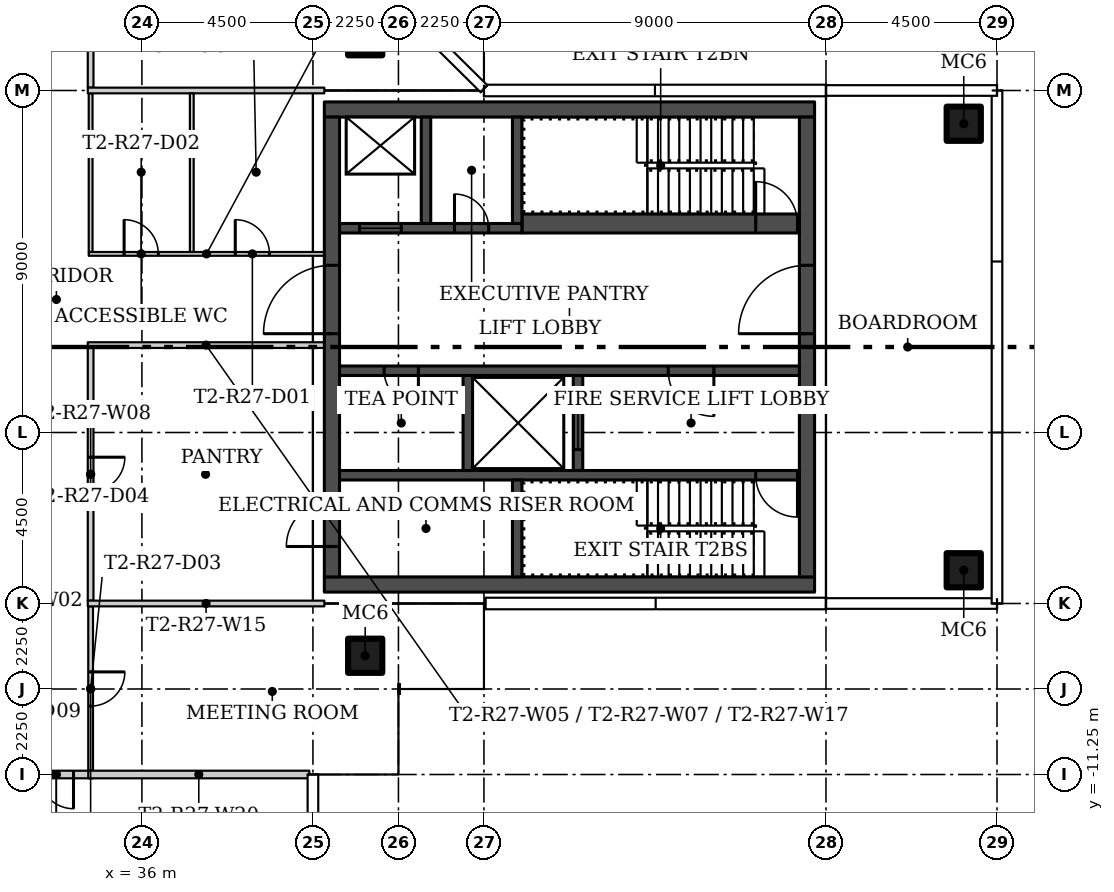
"""IFC4 building model, lengths in metres.
Left out: names, types, materials, properties, quantities, classifications, styles, units other than length and angle.
Written with IfcOpenShell. Run it as: python <this file> out.ifc"""

import sys

from ifc_helpers import new_model, si_unit, direction, frame, frame_2d, origin, origin_2d, place, context, subcontext, project, spatial, rectangle, hollow_rectangle, extrude, element, fill, save


model = new_model("IFC4")
c1 = context("Model", 3, precision=1e-05, world=origin(), true_north=direction((0.0, 1.0)))
c2 = subcontext(c1, "Body", "Model", "MODEL_VIEW")
j1 = project(units=[si_unit("LENGTHUNIT", "METRE"), si_unit("PLANEANGLEUNIT", "RADIAN")], contexts=[c1])
p1 = place(None, origin())
s1 = spatial("IfcSite", under=j1, at=p1, CompositionType="ELEMENT")
p2 = place(p1, origin())
s2 = spatial("IfcBuilding", under=s1, at=p2, CompositionType="ELEMENT")
p3 = place(p2, frame((0.0, 0.0, 249.9)))
s3 = spatial("IfcBuildingStorey", under=s2, at=p3, CompositionType="ELEMENT", Elevation=249.9)
for number, where in (
    (1, (41.875, 8.125, 0.0)),
    (2, (41.875, -8.125, 0.0)),
    (3, (57.625, -5.875, 0.0)),
    (4, (57.625, 5.875, 0.0)),
):
    element("IfcColumn", number, at=place(p3, frame(where)), inside=s3, PredefinedType="COLUMN", context=c2, shape_type="SweptSolid", body=[
        extrude(hollow_rectangle(XDim=0.9, YDim=0.9, WallThickness=0.036, at=origin_2d()), origin(), (0.0, 0.0, 1.0), 3.55),
    ])
p4 = place(p3, frame((40.8, 0.05, 0.0), z_axis=(0.0, 0.0, 1.0), x_axis=(-1.0, 0.0, 0.0)))
e5 = element("IfcWall", 5, at=p4, inside=s3, PredefinedType="PARTITIONING", context=c2, shape_type="SweptSolid", body=[
    extrude(rectangle(XDim=6.225, YDim=0.15, at=frame_2d((3.112, 0.0))), origin(), (0.0, 0.0, 1.0), 3.55),
])
p5 = place(p3, frame((34.6, 2.45, 0.0)))
e6 = element("IfcWall", 6, at=p5, inside=s3, PredefinedType="PARTITIONING", context=c2, shape_type="SweptSolid", body=[
    extrude(rectangle(XDim=6.2, YDim=0.1, at=frame_2d((3.1, 0.0))), origin(), (0.0, 0.0, 1.0), 3.55),
])
p6 = place(p5, frame((3.856, 0.0, 0.0)))
e7 = element("IfcOpeningElement", 7, at=p6, cuts=e6, PredefinedType="OPENING", context=c2, shape_type="SweptSolid", body=[
    extrude(rectangle(XDim=0.9, YDim=2.1, at=frame_2d((0.45, 1.05))), frame((0.0, 0.06, 0.0), z_axis=(0.0, -1.0, 0.0), x_axis=(1.0, 0.0, 0.0)), (0.0, 0.0, 1.0), 0.12),
])
p7 = place(p5, frame((0.931, 0.0, 0.0)))
e8 = element("IfcOpeningElement", 8, at=p7, cuts=e6, PredefinedType="OPENING", context=c2, shape_type="SweptSolid", body=[
    extrude(rectangle(XDim=0.9, YDim=2.1, at=frame_2d((0.45, 1.05))), frame((0.0, 0.06, 0.0), z_axis=(0.0, -1.0, 0.0), x_axis=(1.0, 0.0, 0.0)), (0.0, 0.0, 1.0), 0.12),
])
p8 = place(p3, frame((34.65, 6.675, 0.0), z_axis=(0.0, 0.0, 1.0), x_axis=(0.0, -1.0, 0.0)))
e9 = element("IfcWall", 9, at=p8, inside=s3, PredefinedType="PARTITIONING", context=c2, shape_type="SweptSolid", body=[
    extrude(rectangle(XDim=4.175, YDim=0.1, at=frame_2d((2.087, 0.0))), origin(), (0.0, 0.0, 1.0), 3.55),
])
p9 = place(p3, frame((34.65, -0.025, 0.0), z_axis=(0.0, 0.0, 1.0), x_axis=(0.0, -1.0, 0.0)))
e10 = element("IfcWall", 10, at=p9, inside=s3, PredefinedType="PARTITIONING", context=c2, shape_type="SweptSolid", body=[
    extrude(rectangle(XDim=6.65, YDim=0.15, at=frame_2d((3.325, 0.0))), origin(), (0.0, 0.0, 1.0), 3.55),
])
p10 = place(p9, frame((2.875, 0.0, 0.0)))
e11 = element("IfcOpeningElement", 11, at=p10, cuts=e10, PredefinedType="OPENING", context=c2, shape_type="SweptSolid", body=[
    extrude(rectangle(XDim=0.9, YDim=2.1, at=frame_2d((0.45, 1.05))), frame((0.0, 0.085, 0.0), z_axis=(0.0, -1.0, 0.0), x_axis=(1.0, 0.0, 0.0)), (0.0, 0.0, 1.0), 0.17),
])
p11 = place(p3, frame((34.65, 15.65, 0.0), z_axis=(0.0, 0.0, 1.0), x_axis=(0.0, -1.0, 0.0)))
e12 = element("IfcWall", 12, at=p11, inside=s3, PredefinedType="PARTITIONING", context=c2, shape_type="SweptSolid", body=[
    extrude(rectangle(XDim=8.825, YDim=0.15, at=frame_2d((4.413, 0.0))), origin(), (0.0, 0.0, 1.0), 3.55),
])
p12 = place(p11, frame((3.65, 0.0, 0.0)))
e13 = element("IfcOpeningElement", 13, at=p12, cuts=e12, PredefinedType="OPENING", context=c2, shape_type="SweptSolid", body=[
    extrude(rectangle(XDim=1.5, YDim=2.1, at=frame_2d((0.75, 1.05))), frame((0.0, 0.085, 0.0), z_axis=(0.0, -1.0, 0.0), x_axis=(1.0, 0.0, 0.0)), (0.0, 0.0, 1.0), 0.17),
])
p13 = place(p3, frame((34.65, -6.825, 0.0), z_axis=(0.0, 0.0, 1.0), x_axis=(0.0, -1.0, 0.0)))
e14 = element("IfcWall", 14, at=p13, inside=s3, PredefinedType="PARTITIONING", context=c2, shape_type="SweptSolid", body=[
    extrude(rectangle(XDim=4.325, YDim=0.125, at=frame_2d((2.163, 0.0))), origin(), (0.0, 0.0, 1.0), 3.55),
])
p14 = place(p13, frame((1.725, 0.0, 0.0)))
e15 = element("IfcOpeningElement", 15, at=p14, cuts=e14, PredefinedType="OPENING", context=c2, shape_type="SweptSolid", body=[
    extrude(rectangle(XDim=0.9, YDim=2.1, at=frame_2d((0.45, 1.05))), frame((0.0, 0.073, 0.0), z_axis=(0.0, -1.0, 0.0), x_axis=(1.0, 0.0, 0.0)), (0.0, 0.0, 1.0), 0.145),
])
p15 = place(p3, frame((34.713, -11.25, 0.0), z_axis=(0.0, 0.0, 1.0), x_axis=(-1.0, 0.0, 0.0)))
e16 = element("IfcWall", 16, at=p15, inside=s3, PredefinedType="PARTITIONING", context=c2, shape_type="SweptSolid", body=[
    extrude(rectangle(XDim=1.938, YDim=0.2, at=frame_2d((0.969, 0.0))), origin(), (0.0, 0.0, 1.0), 3.55),
])
p16 = place(p15, frame((0.513, 0.0, 0.0)))
e17 = element("IfcOpeningElement", 17, at=p16, cuts=e16, PredefinedType="OPENING", context=c2, shape_type="SweptSolid", body=[
    extrude(rectangle(XDim=0.9, YDim=2.4, at=frame_2d((0.45, 1.2))), frame((0.0, 0.11, 0.0), z_axis=(0.0, -1.0, 0.0), x_axis=(1.0, 0.0, 0.0)), (0.0, 0.0, 1.0), 0.22),
])
p17 = place(p3, frame((40.8, 6.75, 0.0), z_axis=(0.0, 0.0, 1.0), x_axis=(-1.0, 0.0, 0.0)))
e18 = element("IfcWall", 18, at=p17, inside=s3, PredefinedType="PARTITIONING", context=c2, shape_type="SweptSolid", body=[
    extrude(rectangle(XDim=6.225, YDim=0.15, at=frame_2d((3.112, 0.0))), origin(), (0.0, 0.0, 1.0), 3.55),
])
p18 = place(p3, frame((34.575, -6.75, 0.0)))
e19 = element("IfcWall", 19, at=p18, inside=s3, PredefinedType="PARTITIONING", context=c2, shape_type="SweptSolid", body=[
    extrude(rectangle(XDim=6.225, YDim=0.15, at=frame_2d((3.112, 0.0))), origin(), (0.0, 0.0, 1.0), 3.55),
])
p19 = place(p3, frame((37.312, 6.675, 0.0), z_axis=(0.0, 0.0, 1.0), x_axis=(0.0, -1.0, 0.0)))
e20 = element("IfcWall", 20, at=p19, inside=s3, PredefinedType="PARTITIONING", context=c2, shape_type="SweptSolid", body=[
    extrude(rectangle(XDim=4.175, YDim=0.1, at=frame_2d((2.087, 0.0))), origin(), (0.0, 0.0, 1.0), 3.55),
])
p20 = place(p3, frame((34.588, -11.25, 0.0)))
e21 = element("IfcWall", 21, at=p20, inside=s3, PredefinedType="PARTITIONING", context=c2, shape_type="SweptSolid", body=[
    extrude(rectangle(XDim=5.817, YDim=0.2, at=frame_2d((2.909, 0.0))), origin(), (0.0, 0.0, 1.0), 3.55),
])
for number, where, z_axis, x_axis in (
    (22, (53.7, -6.25, 0.0), (0.0, 0.0, 1.0), (-1.0, 0.0, 0.0)),
    (23, (53.7, 6.25, 0.0), (0.0, 0.0, 1.0), (-1.0, 0.0, 0.0)),
):
    element("IfcWall", number, at=place(p3, frame(where, z_axis=z_axis, x_axis=x_axis)), inside=s3, PredefinedType="SHEAR", context=c2, shape_type="SweptSolid", body=[
        extrude(rectangle(XDim=12.9, YDim=0.4, at=frame_2d((6.45, 0.0))), origin(), (0.0, 0.0, 1.0), 3.55),
    ])
p21 = place(p3, frame((53.5, -6.05, 0.0), z_axis=(0.0, 0.0, 1.0), x_axis=(0.0, 1.0, 0.0)))
e24 = element("IfcWall", 24, at=p21, inside=s3, PredefinedType="SHEAR", context=c2, shape_type="SweptSolid", body=[
    extrude(rectangle(XDim=12.1, YDim=0.4, at=frame_2d((6.05, 0.0))), origin(), (0.0, 0.0, 1.0), 3.55),
])
p22 = place(p21, frame((6.4, 0.0, 0.0)))
e25 = element("IfcOpeningElement", 25, at=p22, cuts=e24, PredefinedType="OPENING", context=c2, shape_type="SweptSolid", body=[
    extrude(rectangle(XDim=1.8, YDim=2.4, at=frame_2d((0.9, 1.2))), frame((0.0, 0.21, 0.0), z_axis=(0.0, -1.0, 0.0), x_axis=(1.0, 0.0, 0.0)), (0.0, 0.0, 1.0), 0.42),
])
p23 = place(p3, frame((41.0, -6.05, 0.0), z_axis=(0.0, 0.0, 1.0), x_axis=(0.0, 1.0, 0.0)))
e26 = element("IfcWall", 26, at=p23, inside=s3, PredefinedType="SHEAR", context=c2, shape_type="SweptSolid", body=[
    extrude(rectangle(XDim=12.1, YDim=0.4, at=frame_2d((6.05, 0.0))), origin(), (0.0, 0.0, 1.0), 3.55),
])
p24 = place(p23, frame((0.8, 0.0, 0.0)))
e27 = element("IfcOpeningElement", 27, at=p24, cuts=e26, PredefinedType="OPENING", context=c2, shape_type="SweptSolid", body=[
    extrude(rectangle(XDim=1.2, YDim=2.1, at=frame_2d((0.6, 1.05))), frame((0.0, 0.21, 0.0), z_axis=(0.0, -1.0, 0.0), x_axis=(1.0, 0.0, 0.0)), (0.0, 0.0, 1.0), 0.42),
])
p25 = place(p23, frame((6.4, 0.0, 0.0)))
e28 = element("IfcOpeningElement", 28, at=p25, cuts=e26, PredefinedType="OPENING", context=c2, shape_type="SweptSolid", body=[
    extrude(rectangle(XDim=1.8, YDim=2.4, at=frame_2d((0.9, 1.2))), frame((0.0, 0.21, 0.0), z_axis=(0.0, -1.0, 0.0), x_axis=(1.0, 0.0, 0.0)), (0.0, 0.0, 1.0), 0.42),
])
p26 = place(p3, frame((53.3, -3.375, 0.0), z_axis=(0.0, 0.0, 1.0), x_axis=(-1.0, 0.0, 0.0)))
e29 = element("IfcWall", 29, at=p26, inside=s3, PredefinedType="SHEAR", context=c2, shape_type="SweptSolid", body=[
    extrude(rectangle(XDim=12.1, YDim=0.25, at=frame_2d((6.05, 0.0))), origin(), (0.0, 0.0, 1.0), 3.55),
])
p27 = place(p26, frame((0.05, 0.0, 0.0)))
e30 = element("IfcOpeningElement", 30, at=p27, cuts=e29, PredefinedType="OPENING", context=c2, shape_type="SweptSolid", body=[
    extrude(rectangle(XDim=1.1, YDim=2.1, at=frame_2d((0.55, 1.05))), frame((0.0, 0.135, 0.0), z_axis=(0.0, -1.0, 0.0), x_axis=(1.0, 0.0, 0.0)), (0.0, 0.0, 1.0), 0.27),
])
p28 = place(p3, frame((45.875, -6.05, 0.0), z_axis=(0.0, 0.0, 1.0), x_axis=(0.0, 1.0, 0.0)))
e31 = element("IfcWall", 31, at=p28, inside=s3, PredefinedType="SHEAR", context=c2, shape_type="SweptSolid", body=[
    extrude(rectangle(XDim=2.55, YDim=0.25, at=frame_2d((1.275, 0.0))), origin(), (0.0, 0.0, 1.0), 3.55),
])
p29 = place(p3, frame((53.3, -0.625, 0.0), z_axis=(0.0, 0.0, 1.0), x_axis=(-1.0, 0.0, 0.0)))
e32 = element("IfcWall", 32, at=p29, inside=s3, PredefinedType="SHEAR", context=c2, shape_type="SweptSolid", body=[
    extrude(rectangle(XDim=12.1, YDim=0.25, at=frame_2d((6.05, 0.0))), origin(), (0.0, 0.0, 1.0), 3.55),
])
p30 = place(p29, frame((2.25, 0.0, 0.0)))
e33 = element("IfcOpeningElement", 33, at=p30, cuts=e32, PredefinedType="OPENING", context=c2, shape_type="SweptSolid", body=[
    extrude(rectangle(XDim=1.2, YDim=2.1, at=frame_2d((0.6, 1.05))), frame((0.0, 0.135, 0.0), z_axis=(0.0, -1.0, 0.0), x_axis=(1.0, 0.0, 0.0)), (0.0, 0.0, 1.0), 0.27),
])
p31 = place(p29, frame((10.025, 0.0, 0.0)))
e34 = element("IfcOpeningElement", 34, at=p31, cuts=e32, PredefinedType="OPENING", context=c2, shape_type="SweptSolid", body=[
    extrude(rectangle(XDim=0.9, YDim=2.1, at=frame_2d((0.45, 1.05))), frame((0.0, 0.135, 0.0), z_axis=(0.0, -1.0, 0.0), x_axis=(1.0, 0.0, 0.0)), (0.0, 0.0, 1.0), 0.27),
])
p32 = place(p3, frame((47.475, -3.25, 0.0), z_axis=(0.0, 0.0, 1.0), x_axis=(0.0, 1.0, 0.0)))
e35 = element("IfcWall", 35, at=p32, inside=s3, PredefinedType="SHEAR", context=c2, shape_type="SweptSolid", body=[
    extrude(rectangle(XDim=2.5, YDim=0.25, at=frame_2d((1.25, 0.0))), origin(), (0.0, 0.0, 1.0), 3.55),
])
p33 = place(p32, frame((0.55, 0.0, 0.0)))
e36 = element("IfcOpeningElement", 36, at=p33, cuts=e35, PredefinedType="OPENING", context=c2, shape_type="SweptSolid", body=[
    extrude(rectangle(XDim=1.4, YDim=2.4, at=frame_2d((0.7, 1.2))), frame((0.0, 0.135, 0.0), z_axis=(0.0, -1.0, 0.0), x_axis=(1.0, 0.0, 0.0)), (0.0, 0.0, 1.0), 0.27),
])
p34 = place(p3, frame((44.575, -3.25, 0.0), z_axis=(0.0, 0.0, 1.0), x_axis=(0.0, 1.0, 0.0)))
e37 = element("IfcWall", 37, at=p34, inside=s3, PredefinedType="SHEAR", context=c2, shape_type="SweptSolid", body=[
    extrude(rectangle(XDim=2.5, YDim=0.25, at=frame_2d((1.25, 0.0))), origin(), (0.0, 0.0, 1.0), 3.55),
])
p35 = place(p3, frame((46.0, 3.25, 0.0)))
e38 = element("IfcWall", 38, at=p35, inside=s3, PredefinedType="SHEAR", context=c2, shape_type="SweptSolid", body=[
    extrude(rectangle(XDim=7.3, YDim=0.5, at=frame_2d((3.65, 0.0))), origin(), (0.0, 0.0, 1.0), 3.55),
])
p36 = place(p35, frame((6.15, 0.0, 0.0)))
e39 = element("IfcOpeningElement", 39, at=p36, cuts=e38, PredefinedType="OPENING", context=c2, shape_type="SweptSolid", body=[
    extrude(rectangle(XDim=1.1, YDim=2.1, at=frame_2d((0.55, 1.05))), frame((0.0, 0.26, 0.0), z_axis=(0.0, -1.0, 0.0), x_axis=(1.0, 0.0, 0.0)), (0.0, 0.0, 1.0), 0.52),
])
p37 = place(p3, frame((41.2, 3.125, 0.0)))
e40 = element("IfcWall", 40, at=p37, inside=s3, PredefinedType="SHEAR", context=c2, shape_type="SweptSolid", body=[
    extrude(rectangle(XDim=4.8, YDim=0.25, at=frame_2d((2.4, 0.0))), origin(), (0.0, 0.0, 1.0), 3.55),
])
p38 = place(p37, frame((0.525, 0.0, 0.0)))
e41 = element("IfcOpeningElement", 41, at=p38, cuts=e40, PredefinedType="OPENING", context=c2, shape_type="SweptSolid", body=[
    extrude(rectangle(XDim=1.1, YDim=2.1, at=frame_2d((0.55, 1.05))), frame((0.0, 0.135, 0.0), z_axis=(0.0, -1.0, 0.0), x_axis=(1.0, 0.0, 0.0)), (0.0, 0.0, 1.0), 0.27),
])
p39 = place(p37, frame((3.025, 0.0, 0.0)))
e42 = element("IfcOpeningElement", 42, at=p39, cuts=e40, PredefinedType="OPENING", context=c2, shape_type="SweptSolid", body=[
    extrude(rectangle(XDim=0.9, YDim=2.1, at=frame_2d((0.45, 1.05))), frame((0.0, 0.135, 0.0), z_axis=(0.0, -1.0, 0.0), x_axis=(1.0, 0.0, 0.0)), (0.0, 0.0, 1.0), 0.27),
])
for number, where, z_axis, x_axis in (
    (43, (45.875, 3.25, 0.0), (0.0, 0.0, 1.0), (0.0, 1.0, 0.0)),
    (44, (43.475, 3.25, 0.0), (0.0, 0.0, 1.0), (0.0, 1.0, 0.0)),
):
    element("IfcWall", number, at=place(p3, frame(where, z_axis=z_axis, x_axis=x_axis)), inside=s3, PredefinedType="SHEAR", context=c2, shape_type="SweptSolid", body=[
        extrude(rectangle(XDim=2.8, YDim=0.25, at=frame_2d((1.4, 0.0))), origin(), (0.0, 0.0, 1.0), 3.55),
    ])
p40 = place(p6, origin())
e45 = element("IfcDoor", 45, at=p40, inside=s3, OperationType="SINGLE_SWING_RIGHT", PredefinedType="DOOR", context=c2, shape_type="SweptSolid", body=[
    extrude(rectangle(XDim=0.9, YDim=2.1, at=frame_2d((0.45, 1.05))), frame((0.0, 0.025, 0.0), z_axis=(0.0, -1.0, 0.0), x_axis=(1.0, 0.0, 0.0)), (0.0, 0.0, 1.0), 0.05),
])
fill(e7, e45)
p41 = place(p7, origin())
e46 = element("IfcDoor", 46, at=p41, inside=s3, OperationType="SINGLE_SWING_RIGHT", PredefinedType="DOOR", context=c2, shape_type="SweptSolid", body=[
    extrude(rectangle(XDim=0.9, YDim=2.1, at=frame_2d((0.45, 1.05))), frame((0.0, 0.025, 0.0), z_axis=(0.0, -1.0, 0.0), x_axis=(1.0, 0.0, 0.0)), (0.0, 0.0, 1.0), 0.05),
])
fill(e8, e46)
p42 = place(p14, origin())
e47 = element("IfcDoor", 47, at=p42, inside=s3, OperationType="SINGLE_SWING_LEFT", PredefinedType="DOOR", context=c2, shape_type="SweptSolid", body=[
    extrude(rectangle(XDim=0.9, YDim=2.1, at=frame_2d((0.45, 1.05))), frame((0.0, 0.025, 0.0), z_axis=(0.0, -1.0, 0.0), x_axis=(1.0, 0.0, 0.0)), (0.0, 0.0, 1.0), 0.05),
])
fill(e15, e47)
p43 = place(p10, origin())
e48 = element("IfcDoor", 48, at=p43, inside=s3, OperationType="SINGLE_SWING_LEFT", PredefinedType="DOOR", context=c2, shape_type="SweptSolid", body=[
    extrude(rectangle(XDim=0.9, YDim=2.1, at=frame_2d((0.45, 1.05))), frame((0.0, 0.025, 0.0), z_axis=(0.0, -1.0, 0.0), x_axis=(1.0, 0.0, 0.0)), (0.0, 0.0, 1.0), 0.05),
])
fill(e11, e48)
p44 = place(p16, origin())
e49 = element("IfcDoor", 49, at=p44, inside=s3, OperationType="SINGLE_SWING_RIGHT", PredefinedType="DOOR", context=c2, shape_type="SweptSolid", body=[
    extrude(rectangle(XDim=0.9, YDim=2.4, at=frame_2d((0.45, 1.2))), frame((0.0, 0.025, 0.0), z_axis=(0.0, -1.0, 0.0), x_axis=(1.0, 0.0, 0.0)), (0.0, 0.0, 1.0), 0.05),
])
fill(e17, e49)
p45 = place(p22, origin())
e50 = element("IfcDoor", 50, at=p45, inside=s3, OperationType="DOUBLE_DOOR_SINGLE_SWING", PredefinedType="DOOR", context=c2, shape_type="SweptSolid", body=[
    extrude(rectangle(XDim=1.8, YDim=2.4, at=frame_2d((0.9, 1.2))), frame((0.0, 0.025, 0.0), z_axis=(0.0, -1.0, 0.0), x_axis=(1.0, 0.0, 0.0)), (0.0, 0.0, 1.0), 0.05),
])
fill(e25, e50)
p46 = place(p24, origin())
e51 = element("IfcDoor", 51, at=p46, inside=s3, OperationType="SINGLE_SWING_LEFT", PredefinedType="DOOR", context=c2, shape_type="SweptSolid", body=[
    extrude(rectangle(XDim=1.2, YDim=2.1, at=frame_2d((0.6, 1.05))), frame((0.0, 0.025, 0.0), z_axis=(0.0, -1.0, 0.0), x_axis=(1.0, 0.0, 0.0)), (0.0, 0.0, 1.0), 0.05),
])
fill(e27, e51)
p47 = place(p25, origin())
e52 = element("IfcDoor", 52, at=p47, inside=s3, OperationType="DOUBLE_DOOR_SINGLE_SWING", PredefinedType="DOOR", context=c2, shape_type="SweptSolid", body=[
    extrude(rectangle(XDim=1.8, YDim=2.4, at=frame_2d((0.9, 1.2))), frame((0.0, 0.025, 0.0), z_axis=(0.0, -1.0, 0.0), x_axis=(1.0, 0.0, 0.0)), (0.0, 0.0, 1.0), 0.05),
])
fill(e28, e52)
p48 = place(p27, origin())
e53 = element("IfcDoor", 53, at=p48, inside=s3, OperationType="SINGLE_SWING_LEFT", PredefinedType="DOOR", context=c2, shape_type="SweptSolid", body=[
    extrude(rectangle(XDim=1.1, YDim=2.1, at=frame_2d((0.55, 1.05))), frame((0.0, 0.025, 0.0), z_axis=(0.0, -1.0, 0.0), x_axis=(1.0, 0.0, 0.0)), (0.0, 0.0, 1.0), 0.05),
])
fill(e30, e53)
p49 = place(p30, origin())
e54 = element("IfcDoor", 54, at=p49, inside=s3, OperationType="SINGLE_SWING_LEFT", PredefinedType="DOOR", context=c2, shape_type="SweptSolid", body=[
    extrude(rectangle(XDim=1.2, YDim=2.1, at=frame_2d((0.6, 1.05))), frame((0.0, 0.025, 0.0), z_axis=(0.0, -1.0, 0.0), x_axis=(1.0, 0.0, 0.0)), (0.0, 0.0, 1.0), 0.05),
])
fill(e33, e54)
p50 = place(p31, origin())
e55 = element("IfcDoor", 55, at=p50, inside=s3, OperationType="SINGLE_SWING_RIGHT", PredefinedType="DOOR", context=c2, shape_type="SweptSolid", body=[
    extrude(rectangle(XDim=0.9, YDim=2.1, at=frame_2d((0.45, 1.05))), frame((0.0, 0.025, 0.0), z_axis=(0.0, -1.0, 0.0), x_axis=(1.0, 0.0, 0.0)), (0.0, 0.0, 1.0), 0.05),
])
fill(e34, e55)
p51 = place(p33, origin())
e56 = element("IfcDoor", 56, at=p51, inside=s3, OperationType="SLIDING_TO_LEFT", PredefinedType="DOOR", context=c2, shape_type="SweptSolid", body=[
    extrude(rectangle(XDim=1.4, YDim=2.4, at=frame_2d((0.7, 1.2))), frame((0.0, 0.025, 0.0), z_axis=(0.0, -1.0, 0.0), x_axis=(1.0, 0.0, 0.0)), (0.0, 0.0, 1.0), 0.05),
])
fill(e36, e56)
p52 = place(p36, origin())
e57 = element("IfcDoor", 57, at=p52, inside=s3, OperationType="SINGLE_SWING_RIGHT", PredefinedType="DOOR", context=c2, shape_type="SweptSolid", body=[
    extrude(rectangle(XDim=1.1, YDim=2.1, at=frame_2d((0.55, 1.05))), frame((0.0, 0.025, 0.0), z_axis=(0.0, -1.0, 0.0), x_axis=(1.0, 0.0, 0.0)), (0.0, 0.0, 1.0), 0.05),
])
fill(e39, e57)
p53 = place(p38, origin())
e58 = element("IfcDoor", 58, at=p53, inside=s3, OperationType="SLIDING_TO_LEFT", PredefinedType="DOOR", context=c2, shape_type="SweptSolid", body=[
    extrude(rectangle(XDim=1.1, YDim=2.1, at=frame_2d((0.55, 1.05))), frame((0.0, 0.025, 0.0), z_axis=(0.0, -1.0, 0.0), x_axis=(1.0, 0.0, 0.0)), (0.0, 0.0, 1.0), 0.05),
])
fill(e41, e58)
p54 = place(p39, origin())
e59 = element("IfcDoor", 59, at=p54, inside=s3, OperationType="SINGLE_SWING_RIGHT", PredefinedType="DOOR", context=c2, shape_type="SweptSolid", body=[
    extrude(rectangle(XDim=0.9, YDim=2.1, at=frame_2d((0.45, 1.05))), frame((0.0, 0.025, 0.0), z_axis=(0.0, -1.0, 0.0), x_axis=(1.0, 0.0, 0.0)), (0.0, 0.0, 1.0), 0.05),
])
fill(e42, e59)
save(model, sys.argv[1])
